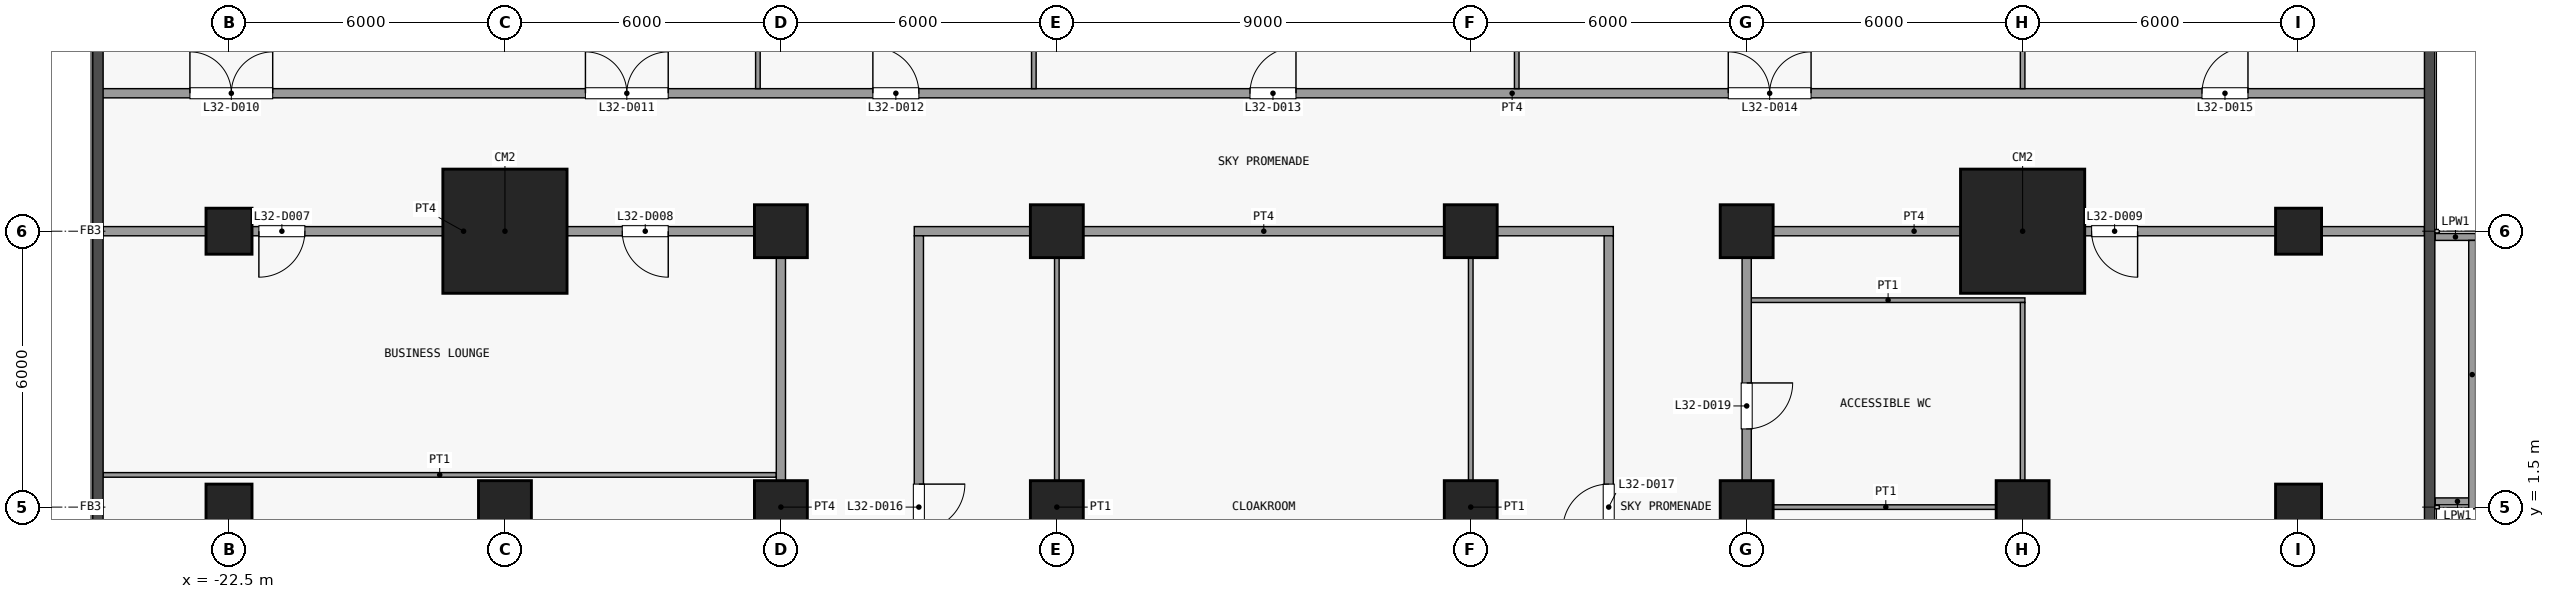
"""IFC4 building model, lengths in metres.
Left out: names, types, materials, properties, quantities, classifications, styles, units other than length and angle.
Written with IfcOpenShell. Run it as: python <this file> out.ifc"""

import sys

from ifc_helpers import new_model, si_unit, direction, frame, frame_2d, origin, origin_2d, place, context, subcontext, project, spatial, rectangle, extrude, element, fill, save


model = new_model("IFC4")
c1 = context("Model", 3, precision=1e-05, world=origin(), true_north=direction((0.0, 1.0)))
c2 = subcontext(c1, "Body", "Model", "MODEL_VIEW")
j1 = project(units=[si_unit("LENGTHUNIT", "METRE"), si_unit("PLANEANGLEUNIT", "RADIAN")], contexts=[c1])
p1 = place(None, origin())
s1 = spatial("IfcSite", under=j1, at=p1, CompositionType="ELEMENT")
p2 = place(p1, origin())
s2 = spatial("IfcBuilding", under=s1, at=p2, CompositionType="ELEMENT")
p3 = place(p2, frame((0.0, 0.0, 127.9)))
s3 = spatial("IfcBuildingStorey", under=s2, at=p3, CompositionType="ELEMENT", Elevation=127.9)
for number, where, z_axis, x_axis in (
    (1, (-22.5, 1.5, 0.0), (0.0, 0.0, 1.0), (1.0, 0.0, 0.0)),
    (2, (-22.5, 7.5, 0.0), (0.0, 0.0, 1.0), (1.0, 0.0, 0.0)),
):
    element("IfcColumn", number, at=place(p3, frame(where, z_axis=z_axis, x_axis=x_axis)), inside=s3, PredefinedType="COLUMN", context=c2, shape_type="SweptSolid", body=[
        extrude(rectangle(XDim=1.0, YDim=1.0, at=origin_2d()), origin(), (0.0, 0.0, 1.0), 6.0),
    ])
p4 = place(p3, frame((-16.5, 1.5, 0.0), z_axis=(0.0, 0.0, 1.0), x_axis=(1.0, 0.0, 0.0)))
e3 = element("IfcColumn", 3, at=p4, inside=s3, PredefinedType="COLUMN", context=c2, shape_type="SweptSolid", body=[
    extrude(rectangle(XDim=1.15, YDim=1.15, at=origin_2d()), origin(), (0.0, 0.0, 1.0), 6.0),
])
p5 = place(p3, frame((-16.5, 7.5, 0.0), z_axis=(0.0, 0.0, 1.0), x_axis=(1.0, 0.0, 0.0)))
e4 = element("IfcColumn", 4, at=p5, inside=s3, PredefinedType="COLUMN", context=c2, shape_type="SweptSolid", body=[
    extrude(rectangle(XDim=2.7, YDim=2.7, at=origin_2d()), origin(), (0.0, 0.0, 1.0), 6.0),
])
for number, where, z_axis, x_axis in (
    (5, (-10.5, 1.5, 0.0), (0.0, 0.0, 1.0), (1.0, 0.0, 0.0)),
    (6, (-10.5, 7.5, 0.0), (0.0, 0.0, 1.0), (1.0, 0.0, 0.0)),
    (7, (-4.5, 1.5, 0.0), (0.0, 0.0, 1.0), (1.0, 0.0, 0.0)),
    (8, (-4.5, 7.5, 0.0), (0.0, 0.0, 1.0), (1.0, 0.0, 0.0)),
    (9, (4.5, 1.5, 0.0), (0.0, 0.0, 1.0), (1.0, 0.0, 0.0)),
    (10, (4.5, 7.5, 0.0), (0.0, 0.0, 1.0), (1.0, 0.0, 0.0)),
    (11, (10.5, 1.5, 0.0), (0.0, 0.0, 1.0), (1.0, 0.0, 0.0)),
    (12, (10.5, 7.5, 0.0), (0.0, 0.0, 1.0), (1.0, 0.0, 0.0)),
    (13, (16.5, 1.5, 0.0), (0.0, 0.0, 1.0), (1.0, 0.0, 0.0)),
):
    element("IfcColumn", number, at=place(p3, frame(where, z_axis=z_axis, x_axis=x_axis)), inside=s3, PredefinedType="COLUMN", context=c2, shape_type="SweptSolid", body=[
        extrude(rectangle(XDim=1.15, YDim=1.15, at=origin_2d()), origin(), (0.0, 0.0, 1.0), 6.0),
    ])
p6 = place(p3, frame((16.5, 7.5, 0.0), z_axis=(0.0, 0.0, 1.0), x_axis=(1.0, 0.0, 0.0)))
e14 = element("IfcColumn", 14, at=p6, inside=s3, PredefinedType="COLUMN", context=c2, shape_type="SweptSolid", body=[
    extrude(rectangle(XDim=2.7, YDim=2.7, at=origin_2d()), origin(), (0.0, 0.0, 1.0), 6.0),
])
for number, where, z_axis, x_axis in (
    (15, (22.5, 1.5, 0.0), (0.0, 0.0, 1.0), (1.0, 0.0, 0.0)),
    (16, (22.5, 7.5, 0.0), (0.0, 0.0, 1.0), (1.0, 0.0, 0.0)),
):
    element("IfcColumn", number, at=place(p3, frame(where, z_axis=z_axis, x_axis=x_axis)), inside=s3, PredefinedType="COLUMN", context=c2, shape_type="SweptSolid", body=[
        extrude(rectangle(XDim=1.0, YDim=1.0, at=origin_2d()), origin(), (0.0, 0.0, 1.0), 6.0),
    ])
p7 = place(p3, frame((26.438, 1.625, 0.0), z_axis=(0.0, 0.0, 1.0), x_axis=(-1.0, 0.0, 0.0)))
e17 = element("IfcWall", 17, at=p7, inside=s3, PredefinedType="PARAPET", context=c2, shape_type="SweptSolid", body=[
    extrude(rectangle(XDim=0.965, YDim=0.15, at=frame_2d((0.482, 0.0))), origin(), (0.0, 0.0, 1.0), 1.15),
])
p8 = place(p3, frame((25.472, 7.375, 0.0), z_axis=(0.0, 0.0, 1.0), x_axis=(1.0, 0.0, 0.0)))
e18 = element("IfcWall", 18, at=p8, inside=s3, PredefinedType="PARAPET", context=c2, shape_type="SweptSolid", body=[
    extrude(rectangle(XDim=0.878, YDim=0.15, at=frame_2d((0.439, 0.0))), origin(), (0.0, 0.0, 1.0), 1.15),
])
p9 = place(p3, frame((26.275, 7.3, 0.0), z_axis=(0.0, 0.0, 1.0), x_axis=(0.0, -1.0, 0.0)))
e19 = element("IfcWall", 19, at=p9, inside=s3, PredefinedType="PARAPET", context=c2, shape_type="SweptSolid", body=[
    extrude(rectangle(XDim=5.838, YDim=0.15, at=frame_2d((2.919, 0.0))), origin(), (0.0, 0.0, 1.0), 1.15),
])
p10 = place(p3, frame((10.6, 1.5, 0.0), z_axis=(0.0, 0.0, 1.0), x_axis=(1.0, 0.0, 0.0)))
e20 = element("IfcWall", 20, at=p10, inside=s3, PredefinedType="PARTITIONING", context=c2, shape_type="SweptSolid", body=[
    extrude(rectangle(XDim=5.85, YDim=0.1, at=frame_2d((2.925, 0.0))), origin(), (0.0, 0.0, 1.0), 5.7),
])
p11 = place(p3, frame((-25.238, 2.2, 0.0), z_axis=(0.0, 0.0, 1.0), x_axis=(1.0, 0.0, 0.0)))
e21 = element("IfcWall", 21, at=p11, inside=s3, PredefinedType="PARTITIONING", context=c2, shape_type="SweptSolid", body=[
    extrude(rectangle(XDim=14.637, YDim=0.1, at=frame_2d((7.319, 0.0))), origin(), (0.0, 0.0, 1.0), 5.7),
])
p12 = place(p3, frame((10.6, 6.0, 0.0), z_axis=(0.0, 0.0, 1.0), x_axis=(1.0, 0.0, 0.0)))
e22 = element("IfcWall", 22, at=p12, inside=s3, PredefinedType="PARTITIONING", context=c2, shape_type="SweptSolid", body=[
    extrude(rectangle(XDim=5.95, YDim=0.1, at=frame_2d((2.975, 0.0))), origin(), (0.0, 0.0, 1.0), 5.7),
])
p13 = place(p3, frame((-25.238, 7.5, 0.0), z_axis=(0.0, 0.0, 1.0), x_axis=(1.0, 0.0, 0.0)))
e23 = element("IfcWall", 23, at=p13, inside=s3, PredefinedType="PARTITIONING", context=c2, shape_type="SweptSolid", body=[
    extrude(rectangle(XDim=14.838, YDim=0.2, at=frame_2d((7.419, 0.0))), origin(), (0.0, 0.0, 1.0), 5.7),
])
p14 = place(p13, frame((3.387, 0.0, 0.0)))
e24 = element("IfcOpeningElement", 24, at=p14, cuts=e23, PredefinedType="OPENING", context=c2, shape_type="SweptSolid", body=[
    extrude(rectangle(XDim=1.0, YDim=2.1, at=frame_2d((0.5, 1.05))), frame((0.0, 0.11, 0.0), z_axis=(0.0, -1.0, 0.0), x_axis=(1.0, 0.0, 0.0)), (0.0, 0.0, 1.0), 0.22),
])
p15 = place(p13, frame((11.288, 0.0, 0.0)))
e25 = element("IfcOpeningElement", 25, at=p15, cuts=e23, PredefinedType="OPENING", context=c2, shape_type="SweptSolid", body=[
    extrude(rectangle(XDim=1.0, YDim=2.1, at=frame_2d((0.5, 1.05))), frame((0.0, 0.11, 0.0), z_axis=(0.0, -1.0, 0.0), x_axis=(1.0, 0.0, 0.0)), (0.0, 0.0, 1.0), 0.22),
])
p16 = place(p3, frame((-7.6, 7.5, 0.0), z_axis=(0.0, 0.0, 1.0), x_axis=(1.0, 0.0, 0.0)))
e26 = element("IfcWall", 26, at=p16, inside=s3, PredefinedType="PARTITIONING", context=c2, shape_type="SweptSolid", body=[
    extrude(rectangle(XDim=15.2, YDim=0.2, at=frame_2d((7.6, 0.0))), origin(), (0.0, 0.0, 1.0), 5.7),
])
p17 = place(p3, frame((10.4, 7.5, 0.0), z_axis=(0.0, 0.0, 1.0), x_axis=(1.0, 0.0, 0.0)))
e27 = element("IfcWall", 27, at=p17, inside=s3, PredefinedType="PARTITIONING", context=c2, shape_type="SweptSolid", body=[
    extrude(rectangle(XDim=14.838, YDim=0.2, at=frame_2d((7.419, 0.0))), origin(), (0.0, 0.0, 1.0), 5.7),
])
p18 = place(p17, frame((7.6, 0.0, 0.0)))
e28 = element("IfcOpeningElement", 28, at=p18, cuts=e27, PredefinedType="OPENING", context=c2, shape_type="SweptSolid", body=[
    extrude(rectangle(XDim=1.0, YDim=2.1, at=frame_2d((0.5, 1.05))), frame((0.0, 0.11, 0.0), z_axis=(0.0, -1.0, 0.0), x_axis=(1.0, 0.0, 0.0)), (0.0, 0.0, 1.0), 0.22),
])
p19 = place(p3, frame((-25.35, 10.5, 0.0), z_axis=(0.0, 0.0, 1.0), x_axis=(1.0, 0.0, 0.0)))
e29 = element("IfcWall", 29, at=p19, inside=s3, PredefinedType="PARTITIONING", context=c2, shape_type="SweptSolid", body=[
    extrude(rectangle(XDim=50.7, YDim=0.2, at=frame_2d((25.35, 0.0))), origin(), (0.0, 0.0, 1.0), 5.7),
])
p20 = place(p19, frame((2.0, 0.0, 0.0)))
e30 = element("IfcOpeningElement", 30, at=p20, cuts=e29, PredefinedType="OPENING", context=c2, shape_type="SweptSolid", body=[
    extrude(rectangle(XDim=1.8, YDim=2.1, at=frame_2d((0.9, 1.05))), frame((0.0, 0.11, 0.0), z_axis=(0.0, -1.0, 0.0), x_axis=(1.0, 0.0, 0.0)), (0.0, 0.0, 1.0), 0.22),
])
p21 = place(p19, frame((10.6, 0.0, 0.0)))
e31 = element("IfcOpeningElement", 31, at=p21, cuts=e29, PredefinedType="OPENING", context=c2, shape_type="SweptSolid", body=[
    extrude(rectangle(XDim=1.8, YDim=2.1, at=frame_2d((0.9, 1.05))), frame((0.0, 0.11, 0.0), z_axis=(0.0, -1.0, 0.0), x_axis=(1.0, 0.0, 0.0)), (0.0, 0.0, 1.0), 0.22),
])
p22 = place(p19, frame((16.85, 0.0, 0.0)))
e32 = element("IfcOpeningElement", 32, at=p22, cuts=e29, PredefinedType="OPENING", context=c2, shape_type="SweptSolid", body=[
    extrude(rectangle(XDim=1.0, YDim=2.1, at=frame_2d((0.5, 1.05))), frame((0.0, 0.11, 0.0), z_axis=(0.0, -1.0, 0.0), x_axis=(1.0, 0.0, 0.0)), (0.0, 0.0, 1.0), 0.22),
])
p23 = place(p19, frame((25.05, 0.0, 0.0)))
e33 = element("IfcOpeningElement", 33, at=p23, cuts=e29, PredefinedType="OPENING", context=c2, shape_type="SweptSolid", body=[
    extrude(rectangle(XDim=1.0, YDim=2.1, at=frame_2d((0.5, 1.05))), frame((0.0, 0.11, 0.0), z_axis=(0.0, -1.0, 0.0), x_axis=(1.0, 0.0, 0.0)), (0.0, 0.0, 1.0), 0.22),
])
p24 = place(p19, frame((35.45, 0.0, 0.0)))
e34 = element("IfcOpeningElement", 34, at=p24, cuts=e29, PredefinedType="OPENING", context=c2, shape_type="SweptSolid", body=[
    extrude(rectangle(XDim=1.8, YDim=2.1, at=frame_2d((0.9, 1.05))), frame((0.0, 0.11, 0.0), z_axis=(0.0, -1.0, 0.0), x_axis=(1.0, 0.0, 0.0)), (0.0, 0.0, 1.0), 0.22),
])
p25 = place(p19, frame((45.75, 0.0, 0.0)))
e35 = element("IfcOpeningElement", 35, at=p25, cuts=e29, PredefinedType="OPENING", context=c2, shape_type="SweptSolid", body=[
    extrude(rectangle(XDim=1.0, YDim=2.1, at=frame_2d((0.5, 1.05))), frame((0.0, 0.11, 0.0), z_axis=(0.0, -1.0, 0.0), x_axis=(1.0, 0.0, 0.0)), (0.0, 0.0, 1.0), 0.22),
])
p26 = place(p3, frame((-11.0, 10.6, 0.0), z_axis=(0.0, 0.0, 1.0), x_axis=(0.0, 1.0, 0.0)))
e36 = element("IfcWall", 36, at=p26, inside=s3, PredefinedType="PARTITIONING", context=c2, shape_type="SweptSolid", body=[
    extrude(rectangle(XDim=11.637, YDim=0.1, at=frame_2d((5.819, 0.0))), origin(), (0.0, 0.0, 1.0), 5.7),
])
p27 = place(p3, frame((-10.5, -4.4, 0.0), z_axis=(0.0, 0.0, 1.0), x_axis=(0.0, 1.0, 0.0)))
e37 = element("IfcWall", 37, at=p27, inside=s3, PredefinedType="PARTITIONING", context=c2, shape_type="SweptSolid", body=[
    extrude(rectangle(XDim=11.8, YDim=0.2, at=frame_2d((5.9, 0.0))), origin(), (0.0, 0.0, 1.0), 5.7),
])
p28 = place(p3, frame((-7.5, -4.4, 0.0), z_axis=(0.0, 0.0, 1.0), x_axis=(0.0, 1.0, 0.0)))
e38 = element("IfcWall", 38, at=p28, inside=s3, PredefinedType="PARTITIONING", context=c2, shape_type="SweptSolid", body=[
    extrude(rectangle(XDim=11.8, YDim=0.2, at=frame_2d((5.9, 0.0))), origin(), (0.0, 0.0, 1.0), 5.7),
])
p29 = place(p28, frame((5.4, 0.0, 0.0)))
e39 = element("IfcOpeningElement", 39, at=p29, cuts=e38, PredefinedType="OPENING", context=c2, shape_type="SweptSolid", body=[
    extrude(rectangle(XDim=1.0, YDim=2.1, at=frame_2d((0.5, 1.05))), frame((0.0, 0.11, 0.0), z_axis=(0.0, -1.0, 0.0), x_axis=(1.0, 0.0, 0.0)), (0.0, 0.0, 1.0), 0.22),
])
p30 = place(p3, frame((-5.0, 10.6, 0.0), z_axis=(0.0, 0.0, 1.0), x_axis=(0.0, 1.0, 0.0)))
e40 = element("IfcWall", 40, at=p30, inside=s3, PredefinedType="PARTITIONING", context=c2, shape_type="SweptSolid", body=[
    extrude(rectangle(XDim=11.637, YDim=0.1, at=frame_2d((5.819, 0.0))), origin(), (0.0, 0.0, 1.0), 5.7),
])
for number, where, z_axis, x_axis in (
    (41, (-4.5, -4.4, 0.0), (0.0, 0.0, 1.0), (0.0, 1.0, 0.0)),
    (42, (4.5, -4.4, 0.0), (0.0, 0.0, 1.0), (0.0, 1.0, 0.0)),
):
    element("IfcWall", number, at=place(p3, frame(where, z_axis=z_axis, x_axis=x_axis)), inside=s3, PredefinedType="PARTITIONING", context=c2, shape_type="SweptSolid", body=[
        extrude(rectangle(XDim=11.8, YDim=0.1, at=frame_2d((5.9, 0.0))), origin(), (0.0, 0.0, 1.0), 5.7),
    ])
p31 = place(p3, frame((5.5, 10.6, 0.0), z_axis=(0.0, 0.0, 1.0), x_axis=(0.0, 1.0, 0.0)))
e43 = element("IfcWall", 43, at=p31, inside=s3, PredefinedType="PARTITIONING", context=c2, shape_type="SweptSolid", body=[
    extrude(rectangle(XDim=11.637, YDim=0.1, at=frame_2d((5.819, 0.0))), origin(), (0.0, 0.0, 1.0), 5.7),
])
p32 = place(p3, frame((7.5, -4.4, 0.0), z_axis=(0.0, 0.0, 1.0), x_axis=(0.0, 1.0, 0.0)))
e44 = element("IfcWall", 44, at=p32, inside=s3, PredefinedType="PARTITIONING", context=c2, shape_type="SweptSolid", body=[
    extrude(rectangle(XDim=11.8, YDim=0.2, at=frame_2d((5.9, 0.0))), origin(), (0.0, 0.0, 1.0), 5.7),
])
p33 = place(p32, frame((5.4, 0.0, 0.0)))
e45 = element("IfcOpeningElement", 45, at=p33, cuts=e44, PredefinedType="OPENING", context=c2, shape_type="SweptSolid", body=[
    extrude(rectangle(XDim=1.0, YDim=2.1, at=frame_2d((0.5, 1.05))), frame((0.0, 0.11, 0.0), z_axis=(0.0, -1.0, 0.0), x_axis=(1.0, 0.0, 0.0)), (0.0, 0.0, 1.0), 0.22),
])
p34 = place(p3, frame((10.5, -4.4, 0.0), z_axis=(0.0, 0.0, 1.0), x_axis=(0.0, 1.0, 0.0)))
e46 = element("IfcWall", 46, at=p34, inside=s3, PredefinedType="PARTITIONING", context=c2, shape_type="SweptSolid", body=[
    extrude(rectangle(XDim=11.8, YDim=0.2, at=frame_2d((5.9, 0.0))), origin(), (0.0, 0.0, 1.0), 5.7),
])
p35 = place(p34, frame((2.4, 0.0, 0.0)))
e47 = element("IfcOpeningElement", 47, at=p35, cuts=e46, PredefinedType="OPENING", context=c2, shape_type="SweptSolid", body=[
    extrude(rectangle(XDim=1.0, YDim=2.1, at=frame_2d((0.5, 1.05))), frame((0.0, 0.11, 0.0), z_axis=(0.0, -1.0, 0.0), x_axis=(1.0, 0.0, 0.0)), (0.0, 0.0, 1.0), 0.22),
])
p36 = place(p34, frame((7.6, 0.0, 0.0)))
e48 = element("IfcOpeningElement", 48, at=p36, cuts=e46, PredefinedType="OPENING", context=c2, shape_type="SweptSolid", body=[
    extrude(rectangle(XDim=1.0, YDim=2.1, at=frame_2d((0.5, 1.05))), frame((0.0, 0.11, 0.0), z_axis=(0.0, -1.0, 0.0), x_axis=(1.0, 0.0, 0.0)), (0.0, 0.0, 1.0), 0.22),
])
p37 = place(p3, frame((16.5, -4.4, 0.0), z_axis=(0.0, 0.0, 1.0), x_axis=(0.0, 1.0, 0.0)))
e49 = element("IfcWall", 49, at=p37, inside=s3, PredefinedType="PARTITIONING", context=c2, shape_type="SweptSolid", body=[
    extrude(rectangle(XDim=10.35, YDim=0.1, at=frame_2d((5.175, 0.0))), origin(), (0.0, 0.0, 1.0), 5.7),
])
p38 = place(p3, frame((16.5, 10.6, 0.0), z_axis=(0.0, 0.0, 1.0), x_axis=(0.0, 1.0, 0.0)))
e50 = element("IfcWall", 50, at=p38, inside=s3, PredefinedType="PARTITIONING", context=c2, shape_type="SweptSolid", body=[
    extrude(rectangle(XDim=11.637, YDim=0.1, at=frame_2d((5.819, 0.0))), origin(), (0.0, 0.0, 1.0), 5.7),
])
p39 = place(p14, origin())
e51 = element("IfcDoor", 51, at=p39, inside=s3, OperationType="SINGLE_SWING_LEFT", PredefinedType="DOOR", context=c2, shape_type="SweptSolid", body=[
    extrude(rectangle(XDim=1.0, YDim=2.1, at=frame_2d((0.5, 1.05))), frame((0.0, 0.025, 0.0), z_axis=(0.0, -1.0, 0.0), x_axis=(1.0, 0.0, 0.0)), (0.0, 0.0, 1.0), 0.05),
])
fill(e24, e51)
p40 = place(p15, origin())
e52 = element("IfcDoor", 52, at=p40, inside=s3, OperationType="SINGLE_SWING_RIGHT", PredefinedType="DOOR", context=c2, shape_type="SweptSolid", body=[
    extrude(rectangle(XDim=1.0, YDim=2.1, at=frame_2d((0.5, 1.05))), frame((0.0, 0.025, 0.0), z_axis=(0.0, -1.0, 0.0), x_axis=(1.0, 0.0, 0.0)), (0.0, 0.0, 1.0), 0.05),
])
fill(e25, e52)
p41 = place(p18, origin())
e53 = element("IfcDoor", 53, at=p41, inside=s3, OperationType="SINGLE_SWING_RIGHT", PredefinedType="DOOR", context=c2, shape_type="SweptSolid", body=[
    extrude(rectangle(XDim=1.0, YDim=2.1, at=frame_2d((0.5, 1.05))), frame((0.0, 0.025, 0.0), z_axis=(0.0, -1.0, 0.0), x_axis=(1.0, 0.0, 0.0)), (0.0, 0.0, 1.0), 0.05),
])
fill(e28, e53)
p42 = place(p20, origin())
e54 = element("IfcDoor", 54, at=p42, inside=s3, OperationType="DOUBLE_DOOR_SINGLE_SWING", PredefinedType="DOOR", context=c2, shape_type="SweptSolid", body=[
    extrude(rectangle(XDim=1.8, YDim=2.1, at=frame_2d((0.9, 1.05))), frame((0.0, 0.025, 0.0), z_axis=(0.0, -1.0, 0.0), x_axis=(1.0, 0.0, 0.0)), (0.0, 0.0, 1.0), 0.05),
])
fill(e30, e54)
p43 = place(p21, origin())
e55 = element("IfcDoor", 55, at=p43, inside=s3, OperationType="DOUBLE_DOOR_SINGLE_SWING", PredefinedType="DOOR", context=c2, shape_type="SweptSolid", body=[
    extrude(rectangle(XDim=1.8, YDim=2.1, at=frame_2d((0.9, 1.05))), frame((0.0, 0.025, 0.0), z_axis=(0.0, -1.0, 0.0), x_axis=(1.0, 0.0, 0.0)), (0.0, 0.0, 1.0), 0.05),
])
fill(e31, e55)
p44 = place(p22, origin())
e56 = element("IfcDoor", 56, at=p44, inside=s3, OperationType="SINGLE_SWING_RIGHT", PredefinedType="DOOR", context=c2, shape_type="SweptSolid", body=[
    extrude(rectangle(XDim=1.0, YDim=2.1, at=frame_2d((0.5, 1.05))), frame((0.0, 0.025, 0.0), z_axis=(0.0, -1.0, 0.0), x_axis=(1.0, 0.0, 0.0)), (0.0, 0.0, 1.0), 0.05),
])
fill(e32, e56)
p45 = place(p23, origin())
e57 = element("IfcDoor", 57, at=p45, inside=s3, OperationType="SINGLE_SWING_LEFT", PredefinedType="DOOR", context=c2, shape_type="SweptSolid", body=[
    extrude(rectangle(XDim=1.0, YDim=2.1, at=frame_2d((0.5, 1.05))), frame((0.0, 0.025, 0.0), z_axis=(0.0, -1.0, 0.0), x_axis=(1.0, 0.0, 0.0)), (0.0, 0.0, 1.0), 0.05),
])
fill(e33, e57)
p46 = place(p24, origin())
e58 = element("IfcDoor", 58, at=p46, inside=s3, OperationType="DOUBLE_DOOR_SINGLE_SWING", PredefinedType="DOOR", context=c2, shape_type="SweptSolid", body=[
    extrude(rectangle(XDim=1.8, YDim=2.1, at=frame_2d((0.9, 1.05))), frame((0.0, 0.025, 0.0), z_axis=(0.0, -1.0, 0.0), x_axis=(1.0, 0.0, 0.0)), (0.0, 0.0, 1.0), 0.05),
])
fill(e34, e58)
p47 = place(p25, origin())
e59 = element("IfcDoor", 59, at=p47, inside=s3, OperationType="SINGLE_SWING_LEFT", PredefinedType="DOOR", context=c2, shape_type="SweptSolid", body=[
    extrude(rectangle(XDim=1.0, YDim=2.1, at=frame_2d((0.5, 1.05))), frame((0.0, 0.025, 0.0), z_axis=(0.0, -1.0, 0.0), x_axis=(1.0, 0.0, 0.0)), (0.0, 0.0, 1.0), 0.05),
])
fill(e35, e59)
p48 = place(p29, origin())
e60 = element("IfcDoor", 60, at=p48, inside=s3, OperationType="SINGLE_SWING_RIGHT", PredefinedType="DOOR", context=c2, shape_type="SweptSolid", body=[
    extrude(rectangle(XDim=1.0, YDim=2.1, at=frame_2d((0.5, 1.05))), frame((0.0, 0.025, 0.0), z_axis=(0.0, -1.0, 0.0), x_axis=(1.0, 0.0, 0.0)), (0.0, 0.0, 1.0), 0.05),
])
fill(e39, e60)
p49 = place(p33, origin())
e61 = element("IfcDoor", 61, at=p49, inside=s3, OperationType="SINGLE_SWING_RIGHT", PredefinedType="DOOR", context=c2, shape_type="SweptSolid", body=[
    extrude(rectangle(XDim=1.0, YDim=2.1, at=frame_2d((0.5, 1.05))), frame((0.0, 0.025, 0.0), z_axis=(0.0, -1.0, 0.0), x_axis=(1.0, 0.0, 0.0)), (0.0, 0.0, 1.0), 0.05),
])
fill(e45, e61)
p50 = place(p36, origin())
e62 = element("IfcDoor", 62, at=p50, inside=s3, OperationType="SINGLE_SWING_RIGHT", PredefinedType="DOOR", context=c2, shape_type="SweptSolid", body=[
    extrude(rectangle(XDim=1.0, YDim=2.1, at=frame_2d((0.5, 1.05))), frame((0.0, 0.025, 0.0), z_axis=(0.0, -1.0, 0.0), x_axis=(1.0, 0.0, 0.0)), (0.0, 0.0, 1.0), 0.05),
])
fill(e48, e62)
save(model, sys.argv[1])
